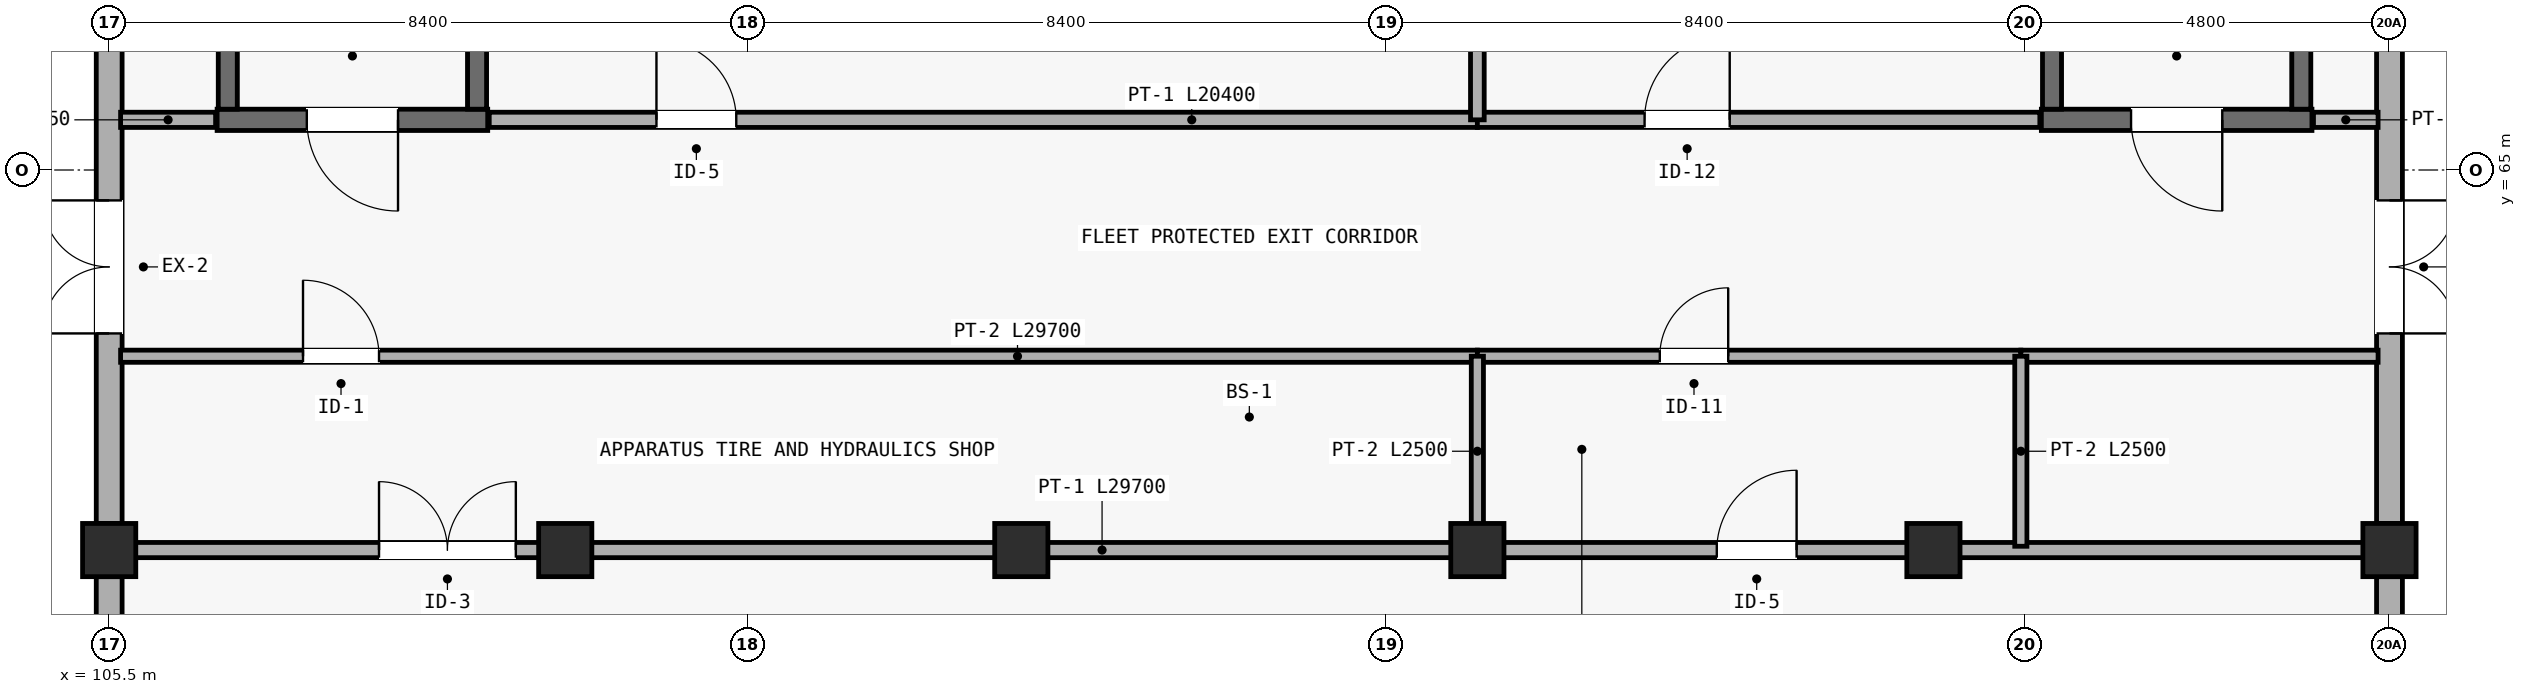
"""IFC4 building model, lengths in metres.
Left out: names, types, materials, properties, quantities, classifications, styles, units other than length and angle.
Written with IfcOpenShell. Run it as: python <this file> out.ifc"""

import sys

from ifc_helpers import new_model, si_unit, direction, frame, frame_2d, origin, origin_2d, place, context, subcontext, project, spatial, rectangle, extrude, element, fill, save


model = new_model("IFC4")
c1 = context("Model", 3, precision=1e-05, world=origin(), true_north=direction((0.0, 1.0)))
c2 = subcontext(c1, "Body", "Model", "MODEL_VIEW")
j1 = project(units=[si_unit("LENGTHUNIT", "METRE"), si_unit("PLANEANGLEUNIT", "RADIAN")], contexts=[c1])
p1 = place(None, origin())
s1 = spatial("IfcSite", under=j1, at=p1, CompositionType="ELEMENT")
p2 = place(p1, origin())
s2 = spatial("IfcBuilding", under=s1, at=p2, CompositionType="ELEMENT")
p3 = place(p2, origin())
s3 = spatial("IfcBuildingStorey", under=s2, at=p3, CompositionType="ELEMENT", Elevation=0.0)
for number, where, z_axis, x_axis in (
    (1, (105.5, 60.0, 0.0), (0.0, 0.0, 1.0), (1.0, 0.0, 0.0)),
    (2, (111.5, 60.0, 0.0), (0.0, 0.0, 1.0), (1.0, 0.0, 0.0)),
    (3, (117.5, 60.0, 0.0), (0.0, 0.0, 1.0), (1.0, 0.0, 0.0)),
    (4, (123.5, 60.0, 0.0), (0.0, 0.0, 1.0), (1.0, 0.0, 0.0)),
    (5, (129.5, 60.0, 0.0), (0.0, 0.0, 1.0), (1.0, 0.0, 0.0)),
    (6, (135.5, 60.0, 0.0), (0.0, 0.0, 1.0), (1.0, 0.0, 0.0)),
):
    element("IfcColumn", number, at=place(p3, frame(where, z_axis=z_axis, x_axis=x_axis)), inside=s3, PredefinedType="COLUMN", context=c2, shape_type="SweptSolid", body=[
        extrude(rectangle(XDim=0.7, YDim=0.7, at=origin_2d()), origin(), (0.0, 0.0, 1.0), 5.85),
    ])
p4 = place(p3, frame((105.5, 48.35, 0.0), z_axis=(0.0, 0.0, 1.0), x_axis=(0.0, 1.0, 0.0)))
e7 = element("IfcWall", 7, at=p4, inside=s3, PredefinedType="STANDARD", context=c2, shape_type="SweptSolid", body=[
    extrude(rectangle(XDim=11.3, YDim=0.34, at=frame_2d((5.65, 0.0))), origin(), (0.0, 0.0, 1.0), 4.749),
])
p5 = place(p4, frame((3.5, 0.0, 0.95)))
e8 = element("IfcOpeningElement", 8, at=p5, cuts=e7, PredefinedType="OPENING", context=c2, shape_type="SweptSolid", body=[
    extrude(rectangle(XDim=2.05, YDim=1.4, at=frame_2d((1.025, 0.7))), frame((0.0, 0.18, 0.0), z_axis=(0.0, -1.0, 0.0), x_axis=(1.0, 0.0, 0.0)), (0.0, 0.0, 1.0), 0.36),
])
p6 = place(p3, frame((105.5, 60.35, 0.0), z_axis=(0.0, 0.0, 1.0), x_axis=(0.0, 1.0, 0.0)))
e9 = element("IfcWall", 9, at=p6, inside=s3, PredefinedType="STANDARD", context=c2, shape_type="SweptSolid", body=[
    extrude(rectangle(XDim=12.3, YDim=0.34, at=frame_2d((6.15, 0.0))), origin(), (0.0, 0.0, 1.0), 4.749),
])
p7 = place(p6, frame((2.5, 0.0, 0.0)))
e10 = element("IfcOpeningElement", 10, at=p7, cuts=e9, PredefinedType="OPENING", context=c2, shape_type="SweptSolid", body=[
    extrude(rectangle(XDim=1.75, YDim=2.2, at=frame_2d((0.875, 1.1))), frame((0.0, 0.18, 0.0), z_axis=(0.0, -1.0, 0.0), x_axis=(1.0, 0.0, 0.0)), (0.0, 0.0, 1.0), 0.36),
])
p8 = place(p3, frame((135.5, 48.35, 0.0), z_axis=(0.0, 0.0, 1.0), x_axis=(0.0, 1.0, 0.0)))
e11 = element("IfcWall", 11, at=p8, inside=s3, PredefinedType="STANDARD", context=c2, shape_type="SweptSolid", body=[
    extrude(rectangle(XDim=11.3, YDim=0.34, at=frame_2d((5.65, 0.0))), origin(), (0.0, 0.0, 1.0), 4.749),
])
p9 = place(p8, frame((3.5, 0.0, 0.95)))
e12 = element("IfcOpeningElement", 12, at=p9, cuts=e11, PredefinedType="OPENING", context=c2, shape_type="SweptSolid", body=[
    extrude(rectangle(XDim=2.05, YDim=1.4, at=frame_2d((1.025, 0.7))), frame((0.0, 0.18, 0.0), z_axis=(0.0, -1.0, 0.0), x_axis=(1.0, 0.0, 0.0)), (0.0, 0.0, 1.0), 0.36),
])
p10 = place(p3, frame((135.5, 60.35, 0.0), z_axis=(0.0, 0.0, 1.0), x_axis=(0.0, 1.0, 0.0)))
e13 = element("IfcWall", 13, at=p10, inside=s3, PredefinedType="STANDARD", context=c2, shape_type="SweptSolid", body=[
    extrude(rectangle(XDim=12.3, YDim=0.34, at=frame_2d((6.15, 0.0))), origin(), (0.0, 0.0, 1.0), 4.749),
])
p11 = place(p10, frame((2.5, 0.0, 0.0)))
e14 = element("IfcOpeningElement", 14, at=p11, cuts=e13, PredefinedType="OPENING", context=c2, shape_type="SweptSolid", body=[
    extrude(rectangle(XDim=1.75, YDim=2.2, at=frame_2d((0.875, 1.1))), frame((0.0, 0.18, 0.0), z_axis=(0.0, -1.0, 0.0), x_axis=(1.0, 0.0, 0.0)), (0.0, 0.0, 1.0), 0.36),
])
p12 = place(p3, frame((110.48, 65.66, 0.0), z_axis=(0.0, 0.0, 1.0), x_axis=(-1.0, 0.0, 0.0)))
e15 = element("IfcWall", 15, at=p12, inside=s3, PredefinedType="SHEAR", context=c2, shape_type="SweptSolid", body=[
    extrude(rectangle(XDim=3.56, YDim=0.28, at=frame_2d((1.78, 0.0))), origin(), (0.0, 0.0, 1.0), 5.6),
])
p13 = place(p12, frame((1.18, 0.0, 0.0)))
e16 = element("IfcOpeningElement", 16, at=p13, cuts=e15, PredefinedType="OPENING", context=c2, shape_type="SweptSolid", body=[
    extrude(rectangle(XDim=1.2, YDim=2.15, at=frame_2d((0.6, 1.075))), frame((0.0, 0.15, 0.0), z_axis=(0.0, -1.0, 0.0), x_axis=(1.0, 0.0, 0.0)), (0.0, 0.0, 1.0), 0.3),
])
for number, where, z_axis, x_axis in (
    (17, (110.34, 65.8, 0.0), (0.0, 0.0, 1.0), (0.0, 1.0, 0.0)),
    (18, (107.06, 72.0, 0.0), (0.0, 0.0, 1.0), (0.0, -1.0, 0.0)),
):
    element("IfcWall", number, at=place(p3, frame(where, z_axis=z_axis, x_axis=x_axis)), inside=s3, PredefinedType="SHEAR", context=c2, shape_type="SweptSolid", body=[
        extrude(rectangle(XDim=6.2, YDim=0.25, at=frame_2d((3.1, 0.0))), origin(), (0.0, 0.0, 1.0), 5.6),
    ])
p14 = place(p3, frame((134.48, 65.66, 0.0), z_axis=(0.0, 0.0, 1.0), x_axis=(-1.0, 0.0, 0.0)))
e19 = element("IfcWall", 19, at=p14, inside=s3, PredefinedType="SHEAR", context=c2, shape_type="SweptSolid", body=[
    extrude(rectangle(XDim=3.56, YDim=0.28, at=frame_2d((1.78, 0.0))), origin(), (0.0, 0.0, 1.0), 5.6),
])
p15 = place(p14, frame((1.18, 0.0, 0.0)))
e20 = element("IfcOpeningElement", 20, at=p15, cuts=e19, PredefinedType="OPENING", context=c2, shape_type="SweptSolid", body=[
    extrude(rectangle(XDim=1.2, YDim=2.15, at=frame_2d((0.6, 1.075))), frame((0.0, 0.15, 0.0), z_axis=(0.0, -1.0, 0.0), x_axis=(1.0, 0.0, 0.0)), (0.0, 0.0, 1.0), 0.3),
])
for number, where, z_axis, x_axis in (
    (21, (134.34, 65.8, 0.0), (0.0, 0.0, 1.0), (0.0, 1.0, 0.0)),
    (22, (131.06, 72.0, 0.0), (0.0, 0.0, 1.0), (0.0, -1.0, 0.0)),
):
    element("IfcWall", number, at=place(p3, frame(where, z_axis=z_axis, x_axis=x_axis)), inside=s3, PredefinedType="SHEAR", context=c2, shape_type="SweptSolid", body=[
        extrude(rectangle(XDim=6.2, YDim=0.25, at=frame_2d((3.1, 0.0))), origin(), (0.0, 0.0, 1.0), 5.6),
    ])
p16 = place(p3, frame((105.65, 60.0, 0.0), z_axis=(0.0, 0.0, 1.0), x_axis=(1.0, 0.0, 0.0)))
e23 = element("IfcWall", 23, at=p16, inside=s3, PredefinedType="PARTITIONING", context=c2, shape_type="SweptSolid", body=[
    extrude(rectangle(XDim=29.7, YDim=0.2, at=frame_2d((14.85, 0.0))), origin(), (0.0, 0.0, 1.0), 4.678),
])
p17 = place(p16, frame((3.4, 0.0, 0.0)))
e24 = element("IfcOpeningElement", 24, at=p17, cuts=e23, PredefinedType="OPENING", context=c2, shape_type="SweptSolid", body=[
    extrude(rectangle(XDim=1.8, YDim=2.18, at=frame_2d((0.9, 1.09))), frame((0.0, 0.11, 0.0), z_axis=(0.0, -1.0, 0.0), x_axis=(1.0, 0.0, 0.0)), (0.0, 0.0, 1.0), 0.22),
])
p18 = place(p16, frame((21.0, 0.0, 0.0)))
e25 = element("IfcOpeningElement", 25, at=p18, cuts=e23, PredefinedType="OPENING", context=c2, shape_type="SweptSolid", body=[
    extrude(rectangle(XDim=1.05, YDim=2.14, at=frame_2d((0.525, 1.07))), frame((0.0, 0.11, 0.0), z_axis=(0.0, -1.0, 0.0), x_axis=(1.0, 0.0, 0.0)), (0.0, 0.0, 1.0), 0.22),
])
p19 = place(p3, frame((105.65, 62.55, 0.0), z_axis=(0.0, 0.0, 1.0), x_axis=(1.0, 0.0, 0.0)))
e26 = element("IfcWall", 26, at=p19, inside=s3, PredefinedType="PARTITIONING", context=c2, shape_type="SweptSolid", body=[
    extrude(rectangle(XDim=17.85, YDim=0.16, at=frame_2d((8.925, 0.0))), origin(), (0.0, 0.0, 1.0), 5.0),
])
p20 = place(p19, frame((2.4, 0.0, 0.0)))
e27 = element("IfcOpeningElement", 27, at=p20, cuts=e26, PredefinedType="OPENING", context=c2, shape_type="SweptSolid", body=[
    extrude(rectangle(XDim=1.0, YDim=2.12, at=frame_2d((0.5, 1.06))), frame((0.0, 0.09, 0.0), z_axis=(0.0, -1.0, 0.0), x_axis=(1.0, 0.0, 0.0)), (0.0, 0.0, 1.0), 0.18),
])
p21 = place(p3, frame((123.5, 62.55, 0.0), z_axis=(0.0, 0.0, 1.0), x_axis=(1.0, 0.0, 0.0)))
e28 = element("IfcWall", 28, at=p21, inside=s3, PredefinedType="PARTITIONING", context=c2, shape_type="SweptSolid", body=[
    extrude(rectangle(XDim=7.15, YDim=0.16, at=frame_2d((3.575, 0.0))), origin(), (0.0, 0.0, 1.0), 5.0),
])
p22 = place(p21, frame((2.4, 0.0, 0.0)))
e29 = element("IfcOpeningElement", 29, at=p22, cuts=e28, PredefinedType="OPENING", context=c2, shape_type="SweptSolid", body=[
    extrude(rectangle(XDim=0.9, YDim=2.08, at=frame_2d((0.45, 1.04))), frame((0.0, 0.09, 0.0), z_axis=(0.0, -1.0, 0.0), x_axis=(1.0, 0.0, 0.0)), (0.0, 0.0, 1.0), 0.18),
])
p23 = place(p3, frame((130.65, 62.55, 0.0), z_axis=(0.0, 0.0, 1.0), x_axis=(1.0, 0.0, 0.0)))
e30 = element("IfcWall", 30, at=p23, inside=s3, PredefinedType="PARTITIONING", context=c2, shape_type="SweptSolid", body=[
    extrude(rectangle(XDim=4.7, YDim=0.16, at=frame_2d((2.35, 0.0))), origin(), (0.0, 0.0, 1.0), 5.0),
])
p24 = place(p3, frame((123.5, 60.05, 0.0), z_axis=(0.0, 0.0, 1.0), x_axis=(0.0, 1.0, 0.0)))
e31 = element("IfcWall", 31, at=p24, inside=s3, PredefinedType="PARTITIONING", context=c2, shape_type="SweptSolid", body=[
    extrude(rectangle(XDim=2.5, YDim=0.16, at=frame_2d((1.25, 0.0))), origin(), (0.0, 0.0, 1.0), 4.749),
])
p25 = place(p3, frame((130.65, 60.05, 0.0), z_axis=(0.0, 0.0, 1.0), x_axis=(0.0, 1.0, 0.0)))
e32 = element("IfcWall", 32, at=p25, inside=s3, PredefinedType="PARTITIONING", context=c2, shape_type="SweptSolid", body=[
    extrude(rectangle(XDim=2.5, YDim=0.16, at=frame_2d((1.25, 0.0))), origin(), (0.0, 0.0, 1.0), 5.0),
])
p26 = place(p3, frame((105.65, 65.66, 0.0), z_axis=(0.0, 0.0, 1.0), x_axis=(1.0, 0.0, 0.0)))
e33 = element("IfcWall", 33, at=p26, inside=s3, PredefinedType="PARTITIONING", context=c2, shape_type="SweptSolid", body=[
    extrude(rectangle(XDim=1.25, YDim=0.2, at=frame_2d((0.625, 0.0))), origin(), (0.0, 0.0, 1.0), 5.0),
])
p27 = place(p3, frame((110.5, 65.66, 0.0), z_axis=(0.0, 0.0, 1.0), x_axis=(1.0, 0.0, 0.0)))
e34 = element("IfcWall", 34, at=p27, inside=s3, PredefinedType="PARTITIONING", context=c2, shape_type="SweptSolid", body=[
    extrude(rectangle(XDim=13.0, YDim=0.2, at=frame_2d((6.5, 0.0))), origin(), (0.0, 0.0, 1.0), 5.0),
])
p28 = place(p27, frame((2.2, 0.0, 0.0)))
e35 = element("IfcOpeningElement", 35, at=p28, cuts=e34, PredefinedType="OPENING", context=c2, shape_type="SweptSolid", body=[
    extrude(rectangle(XDim=1.05, YDim=2.14, at=frame_2d((0.525, 1.07))), frame((0.0, 0.11, 0.0), z_axis=(0.0, -1.0, 0.0), x_axis=(1.0, 0.0, 0.0)), (0.0, 0.0, 1.0), 0.22),
])
p29 = place(p3, frame((123.5, 65.66, 0.0), z_axis=(0.0, 0.0, 1.0), x_axis=(1.0, 0.0, 0.0)))
e36 = element("IfcWall", 36, at=p29, inside=s3, PredefinedType="PARTITIONING", context=c2, shape_type="SweptSolid", body=[
    extrude(rectangle(XDim=7.4, YDim=0.2, at=frame_2d((3.7, 0.0))), origin(), (0.0, 0.0, 1.0), 5.0),
])
p30 = place(p29, frame((2.2, 0.0, 0.0)))
e37 = element("IfcOpeningElement", 37, at=p30, cuts=e36, PredefinedType="OPENING", context=c2, shape_type="SweptSolid", body=[
    extrude(rectangle(XDim=1.12, YDim=2.15, at=frame_2d((0.56, 1.075))), frame((0.0, 0.11, 0.0), z_axis=(0.0, -1.0, 0.0), x_axis=(1.0, 0.0, 0.0)), (0.0, 0.0, 1.0), 0.22),
])
p31 = place(p3, frame((134.5, 65.66, 0.0), z_axis=(0.0, 0.0, 1.0), x_axis=(1.0, 0.0, 0.0)))
e38 = element("IfcWall", 38, at=p31, inside=s3, PredefinedType="PARTITIONING", context=c2, shape_type="SweptSolid", body=[
    extrude(rectangle(XDim=0.85, YDim=0.2, at=frame_2d((0.425, 0.0))), origin(), (0.0, 0.0, 1.0), 5.0),
])
p32 = place(p3, frame((123.5, 65.66, 0.0), z_axis=(0.0, 0.0, 1.0), x_axis=(0.0, 1.0, 0.0)))
e39 = element("IfcWall", 39, at=p32, inside=s3, PredefinedType="PARTITIONING", context=c2, shape_type="SweptSolid", body=[
    extrude(rectangle(XDim=7.19, YDim=0.18, at=frame_2d((3.595, 0.0))), origin(), (0.0, 0.0, 1.0), 4.749),
])
p33 = place(p7, origin())
e40 = element("IfcDoor", 40, at=p33, inside=s3, OperationType="DOUBLE_DOOR_SINGLE_SWING", PredefinedType="DOOR", context=c2, shape_type="SweptSolid", body=[
    extrude(rectangle(XDim=1.75, YDim=2.2, at=frame_2d((0.875, 1.1))), frame((0.0, 0.025, 0.0), z_axis=(0.0, -1.0, 0.0), x_axis=(1.0, 0.0, 0.0)), (0.0, 0.0, 1.0), 0.05),
])
fill(e10, e40)
p34 = place(p11, frame((1.75, 0.0, 0.0), z_axis=(0.0, 0.0, 1.0), x_axis=(-1.0, 0.0, 0.0)))
e41 = element("IfcDoor", 41, at=p34, inside=s3, OperationType="DOUBLE_DOOR_SINGLE_SWING", PredefinedType="DOOR", context=c2, shape_type="SweptSolid", body=[
    extrude(rectangle(XDim=1.75, YDim=2.2, at=frame_2d((0.875, 1.1))), frame((0.0, 0.025, 0.0), z_axis=(0.0, -1.0, 0.0), x_axis=(1.0, 0.0, 0.0)), (0.0, 0.0, 1.0), 0.05),
])
fill(e14, e41)
p35 = place(p13, origin())
e42 = element("IfcDoor", 42, at=p35, inside=s3, OperationType="SINGLE_SWING_LEFT", PredefinedType="DOOR", context=c2, shape_type="SweptSolid", body=[
    extrude(rectangle(XDim=1.2, YDim=2.15, at=frame_2d((0.6, 1.075))), frame((0.0, 0.025, 0.0), z_axis=(0.0, -1.0, 0.0), x_axis=(1.0, 0.0, 0.0)), (0.0, 0.0, 1.0), 0.05),
])
fill(e16, e42)
p36 = place(p15, origin())
e43 = element("IfcDoor", 43, at=p36, inside=s3, OperationType="SINGLE_SWING_LEFT", PredefinedType="DOOR", context=c2, shape_type="SweptSolid", body=[
    extrude(rectangle(XDim=1.2, YDim=2.15, at=frame_2d((0.6, 1.075))), frame((0.0, 0.025, 0.0), z_axis=(0.0, -1.0, 0.0), x_axis=(1.0, 0.0, 0.0)), (0.0, 0.0, 1.0), 0.05),
])
fill(e20, e43)
p37 = place(p17, origin())
e44 = element("IfcDoor", 44, at=p37, inside=s3, OperationType="DOUBLE_DOOR_SINGLE_SWING", PredefinedType="DOOR", context=c2, shape_type="SweptSolid", body=[
    extrude(rectangle(XDim=1.8, YDim=2.18, at=frame_2d((0.9, 1.09))), frame((0.0, 0.025, 0.0), z_axis=(0.0, -1.0, 0.0), x_axis=(1.0, 0.0, 0.0)), (0.0, 0.0, 1.0), 0.05),
])
fill(e24, e44)
p38 = place(p18, origin())
e45 = element("IfcDoor", 45, at=p38, inside=s3, OperationType="SINGLE_SWING_RIGHT", PredefinedType="DOOR", context=c2, shape_type="SweptSolid", body=[
    extrude(rectangle(XDim=1.05, YDim=2.14, at=frame_2d((0.525, 1.07))), frame((0.0, 0.025, 0.0), z_axis=(0.0, -1.0, 0.0), x_axis=(1.0, 0.0, 0.0)), (0.0, 0.0, 1.0), 0.05),
])
fill(e25, e45)
p39 = place(p20, origin())
e46 = element("IfcDoor", 46, at=p39, inside=s3, OperationType="SINGLE_SWING_LEFT", PredefinedType="DOOR", context=c2, shape_type="SweptSolid", body=[
    extrude(rectangle(XDim=1.0, YDim=2.12, at=frame_2d((0.5, 1.06))), frame((0.0, 0.025, 0.0), z_axis=(0.0, -1.0, 0.0), x_axis=(1.0, 0.0, 0.0)), (0.0, 0.0, 1.0), 0.05),
])
fill(e27, e46)
p40 = place(p22, origin())
e47 = element("IfcDoor", 47, at=p40, inside=s3, OperationType="SINGLE_SWING_RIGHT", PredefinedType="DOOR", context=c2, shape_type="SweptSolid", body=[
    extrude(rectangle(XDim=0.9, YDim=2.08, at=frame_2d((0.45, 1.04))), frame((0.0, 0.025, 0.0), z_axis=(0.0, -1.0, 0.0), x_axis=(1.0, 0.0, 0.0)), (0.0, 0.0, 1.0), 0.05),
])
fill(e29, e47)
p41 = place(p28, origin())
e48 = element("IfcDoor", 48, at=p41, inside=s3, OperationType="SINGLE_SWING_LEFT", PredefinedType="DOOR", context=c2, shape_type="SweptSolid", body=[
    extrude(rectangle(XDim=1.05, YDim=2.14, at=frame_2d((0.525, 1.07))), frame((0.0, 0.025, 0.0), z_axis=(0.0, -1.0, 0.0), x_axis=(1.0, 0.0, 0.0)), (0.0, 0.0, 1.0), 0.05),
])
fill(e35, e48)
p42 = place(p30, origin())
e49 = element("IfcDoor", 49, at=p42, inside=s3, OperationType="SINGLE_SWING_RIGHT", PredefinedType="DOOR", context=c2, shape_type="SweptSolid", body=[
    extrude(rectangle(XDim=1.12, YDim=2.15, at=frame_2d((0.56, 1.075))), frame((0.0, 0.025, 0.0), z_axis=(0.0, -1.0, 0.0), x_axis=(1.0, 0.0, 0.0)), (0.0, 0.0, 1.0), 0.05),
])
fill(e37, e49)
save(model, sys.argv[1])
